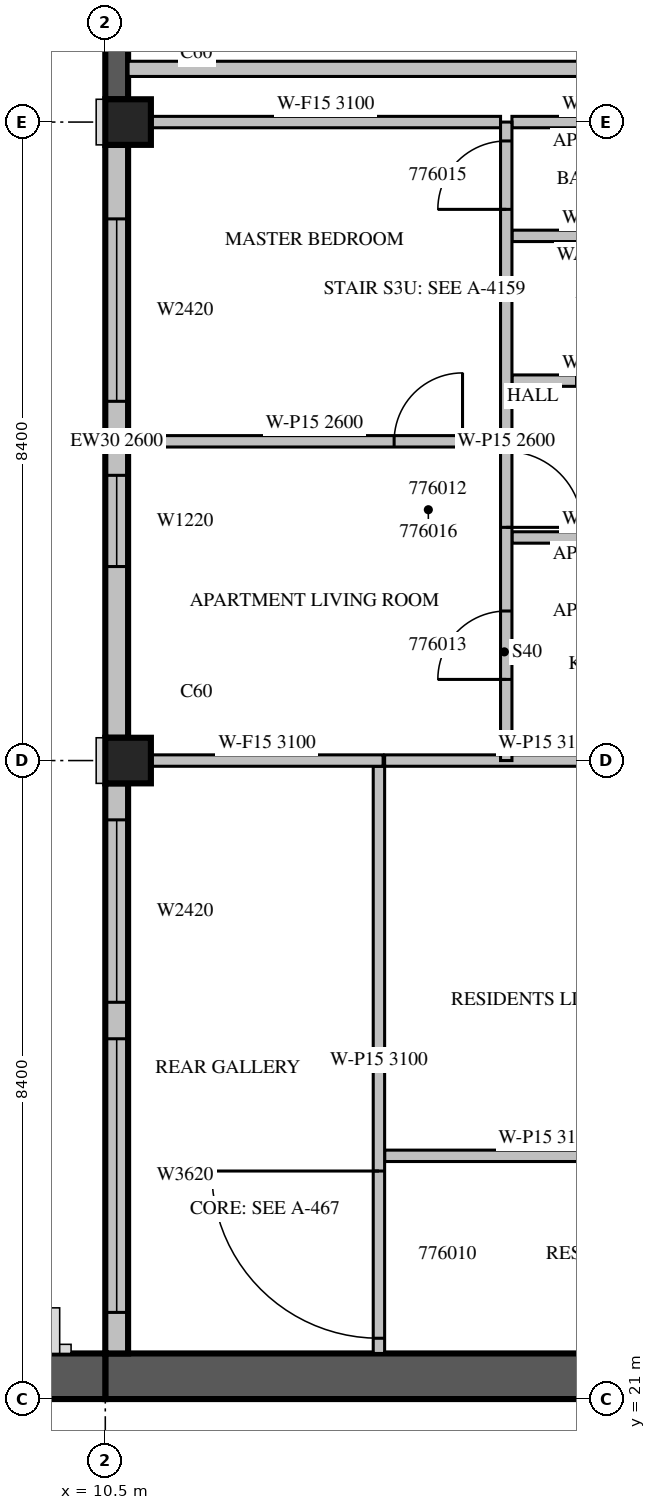
"""IFC4 building model, lengths in metres.
Left out: names, types, materials, properties, quantities, classifications, styles, units other than length and angle.
Written with IfcOpenShell. Run it as: python <this file> out.ifc"""

import sys

from ifc_helpers import new_model, si_unit, direction, frame, frame_2d, origin, origin_2d, place, context, subcontext, project, spatial, rectangle, extrude, source, transform, mapped, element, fill, save


model = new_model("IFC4")
c1 = context("Model", 3, precision=1e-05, world=origin(), true_north=direction((0.0, 1.0)))
c2 = subcontext(c1, "Body", "Model", "MODEL_VIEW")
j1 = project(units=[si_unit("LENGTHUNIT", "METRE"), si_unit("PLANEANGLEUNIT", "RADIAN")], contexts=[c1])
p1 = place(None, origin())
s1 = spatial("IfcSite", under=j1, at=p1, CompositionType="ELEMENT")
p2 = place(p1, origin())
s2 = spatial("IfcBuilding", under=s1, at=p2, CompositionType="ELEMENT")
p3 = place(p2, frame((0.0, 0.0, 326.5)))
s3 = spatial("IfcBuildingStorey", under=s2, at=p3, CompositionType="ELEMENT", Elevation=326.5)
m1 = source(origin(), c2, "Body", "SweptSolid", [
    extrude(rectangle(XDim=0.6, YDim=0.6, at=origin_2d()), origin(), (0.0, 0.0, 1.0), 3.5),
])
for number, where, z_axis, x_axis in (
    (1, (10.8, 29.4, 0.0), (0.0, 0.0, 1.0), (1.0, 0.0, 0.0)),
    (2, (10.8, 37.8, 0.0), (0.0, 0.0, 1.0), (1.0, 0.0, 0.0)),
):
    element("IfcColumn", number, at=place(p3, frame(where, z_axis=z_axis, x_axis=x_axis)), inside=s3, PredefinedType="COLUMN", context=c2, shape_type="MappedRepresentation", body=[
        mapped(m1, transform((0.0, 0.0, 0.0), scale=1.0)),
    ])
m2 = source(origin(), c2, "Body", "SweptSolid", [
    extrude(rectangle(XDim=11.1, YDim=0.6, at=frame_2d((5.55, 0.0))), origin(), (0.0, 0.0, 1.0), 3.5),
])
p4 = place(p3, frame((10.5, 21.3, 0.0), z_axis=(0.0, 0.0, 1.0), x_axis=(1.0, 0.0, 0.0)))
e3 = element("IfcWall", 3, at=p4, inside=s3, PredefinedType="SHEAR", context=c2, shape_type="MappedRepresentation", body=[
    mapped(m2, transform((0.0, 0.0, 0.0), scale=1.0)),
])
m3 = source(origin(), c2, "Body", "SweptSolid", [
    extrude(rectangle(XDim=1.2, YDim=2.1, at=frame_2d((0.6, 1.05))), frame((0.0, 0.31, 0.0), z_axis=(0.0, -1.0, 0.0), x_axis=(1.0, 0.0, 0.0)), (0.0, 0.0, 1.0), 0.62),
])
p5 = place(p4, frame((8.7, 0.0, 0.0)))
e4 = element("IfcOpeningElement", 4, at=p5, cuts=e3, PredefinedType="OPENING", context=c2, shape_type="MappedRepresentation", body=[
    mapped(m3, transform((0.0, 0.0, 0.0), scale=1.0)),
])
m4 = source(origin(), c2, "Body", "SweptSolid", [
    extrude(rectangle(XDim=6.6, YDim=0.6, at=frame_2d((3.3, 0.0))), origin(), (0.0, 0.0, 1.0), 3.5),
])
p6 = place(p3, frame((3.9, 21.3, 0.0), z_axis=(0.0, 0.0, 1.0), x_axis=(1.0, 0.0, 0.0)))
e5 = element("IfcWall", 5, at=p6, inside=s3, PredefinedType="SHEAR", context=c2, shape_type="MappedRepresentation", body=[
    mapped(m4, transform((0.0, 0.0, 0.0), scale=1.0)),
])
m5 = source(origin(), c2, "Body", "SweptSolid", [
    extrude(rectangle(XDim=1.2, YDim=2.4, at=frame_2d((0.6, 1.2))), frame((0.0, 0.31, 0.0), z_axis=(0.0, -1.0, 0.0), x_axis=(1.0, 0.0, 0.0)), (0.0, 0.0, 1.0), 0.62),
])
p7 = place(p6, frame((1.5, 0.0, 0.6)))
e6 = element("IfcOpeningElement", 6, at=p7, cuts=e5, PredefinedType="OPENING", context=c2, shape_type="MappedRepresentation", body=[
    mapped(m5, transform((0.0, 0.0, 0.0), scale=1.0)),
])
p8 = place(p6, frame((3.6, 0.0, 0.6)))
e7 = element("IfcOpeningElement", 7, at=p8, cuts=e5, PredefinedType="OPENING", context=c2, shape_type="MappedRepresentation", body=[
    mapped(m5, transform((0.0, 0.0, 0.0), scale=1.0)),
])
p9 = place(p3, frame((10.65, 43.68, 0.0), z_axis=(0.0, 0.0, 1.0), x_axis=(0.0, -1.0, 0.0)))
e8 = element("IfcWall", 8, at=p9, inside=s3, PredefinedType="SOLIDWALL", context=c2, shape_type="SweptSolid", body=[
    extrude(rectangle(XDim=5.58, YDim=0.3, at=frame_2d((2.79, 0.0))), origin(), (0.0, 0.0, 1.0), 3.1),
])
m6 = source(origin(), c2, "Body", "SweptSolid", [
    extrude(rectangle(XDim=7.8, YDim=0.3, at=frame_2d((3.9, 0.0))), origin(), (0.0, 0.0, 1.0), 2.6),
])
p10 = place(p3, frame((10.65, 37.5, 0.0), z_axis=(0.0, 0.0, 1.0), x_axis=(0.0, -1.0, 0.0)))
e9 = element("IfcWall", 9, at=p10, inside=s3, PredefinedType="STANDARD", context=c2, shape_type="MappedRepresentation", body=[
    mapped(m6, transform((0.0, 0.0, 0.0), scale=1.0)),
])
m7 = source(origin(), c2, "Body", "SweptSolid", [
    extrude(rectangle(XDim=1.2, YDim=2.0, at=frame_2d((0.6, 1.0))), frame((0.0, 0.16, 0.0), z_axis=(0.0, -1.0, 0.0), x_axis=(1.0, 0.0, 0.0)), (0.0, 0.0, 1.0), 0.32),
])
p11 = place(p10, frame((4.348, 0.0, 0.6)))
e10 = element("IfcOpeningElement", 10, at=p11, cuts=e9, PredefinedType="OPENING", context=c2, shape_type="MappedRepresentation", body=[
    mapped(m7, transform((0.0, 0.0, 0.0), scale=1.0)),
])
m8 = source(origin(), c2, "Body", "SweptSolid", [
    extrude(rectangle(XDim=2.4, YDim=2.0, at=frame_2d((1.2, 1.0))), frame((0.0, 0.16, 0.0), z_axis=(0.0, -1.0, 0.0), x_axis=(1.0, 0.0, 0.0)), (0.0, 0.0, 1.0), 0.32),
])
p12 = place(p10, frame((0.974, 0.0, 0.6)))
e11 = element("IfcOpeningElement", 11, at=p12, cuts=e9, PredefinedType="OPENING", context=c2, shape_type="MappedRepresentation", body=[
    mapped(m8, transform((0.0, 0.0, 0.0), scale=1.0)),
])
m9 = source(origin(), c2, "Body", "SweptSolid", [
    extrude(rectangle(XDim=7.5, YDim=0.3, at=frame_2d((3.75, 0.0))), origin(), (0.0, 0.0, 1.0), 3.1),
])
p13 = place(p3, frame((10.65, 29.1, 0.0), z_axis=(0.0, 0.0, 1.0), x_axis=(0.0, -1.0, 0.0)))
e12 = element("IfcWall", 12, at=p13, inside=s3, PredefinedType="STANDARD", context=c2, shape_type="MappedRepresentation", body=[
    mapped(m9, transform((0.0, 0.0, 0.0), scale=1.0)),
])
m10 = source(origin(), c2, "Body", "SweptSolid", [
    extrude(rectangle(XDim=3.6, YDim=2.0, at=frame_2d((1.8, 1.0))), frame((0.0, 0.16, 0.0), z_axis=(0.0, -1.0, 0.0), x_axis=(1.0, 0.0, 0.0)), (0.0, 0.0, 1.0), 0.32),
])
p14 = place(p13, frame((3.36, 0.0, 0.6)))
e13 = element("IfcOpeningElement", 13, at=p14, cuts=e12, PredefinedType="OPENING", context=c2, shape_type="MappedRepresentation", body=[
    mapped(m10, transform((0.0, 0.0, 0.0), scale=1.0)),
])
p15 = place(p13, frame((0.48, 0.0, 0.6)))
e14 = element("IfcOpeningElement", 14, at=p15, cuts=e12, PredefinedType="OPENING", context=c2, shape_type="MappedRepresentation", body=[
    mapped(m8, transform((0.0, 0.0, 0.0), scale=1.0)),
])
m11 = source(origin(), c2, "Body", "SweptSolid", [
    extrude(rectangle(XDim=8.0, YDim=0.2, at=frame_2d((4.0, 0.0))), origin(), (0.0, 0.0, 1.0), 3.1),
])
p16 = place(p3, frame((10.8, 38.5, 0.0), z_axis=(0.0, 0.0, 1.0), x_axis=(1.0, 0.0, 0.0)))
e15 = element("IfcWall", 15, at=p16, inside=s3, PredefinedType="PARTITIONING", context=c2, shape_type="MappedRepresentation", body=[
    mapped(m11, transform((0.0, 0.0, 0.0), scale=1.0)),
])
m12 = source(origin(), c2, "Body", "SweptSolid", [
    extrude(rectangle(XDim=4.275, YDim=0.15, at=frame_2d((2.138, 0.0))), origin(), (0.0, 0.0, 1.0), 3.1),
])
for number, where, z_axis, x_axis in (
    (16, (14.175, 24.2, 0.0), (0.0, 0.0, 1.0), (1.0, 0.0, 0.0)),
    (17, (18.45, 29.4, 0.0), (0.0, 0.0, 1.0), (-1.0, 0.0, 0.0)),
):
    element("IfcWall", number, at=place(p3, frame(where, z_axis=z_axis, x_axis=x_axis)), inside=s3, PredefinedType="PARTITIONING", context=c2, shape_type="MappedRepresentation", body=[
        mapped(m12, transform((0.0, 0.0, 0.0), scale=1.0)),
    ])
m13 = source(origin(), c2, "Body", "SweptSolid", [
    extrude(rectangle(XDim=7.725, YDim=0.15, at=frame_2d((3.862, 0.0))), origin(), (0.0, 0.0, 1.0), 3.1),
])
p17 = place(p3, frame((14.1, 29.325, 0.0), z_axis=(0.0, 0.0, 1.0), x_axis=(0.0, -1.0, 0.0)))
e18 = element("IfcWall", 18, at=p17, inside=s3, PredefinedType="PARTITIONING", context=c2, shape_type="MappedRepresentation", body=[
    mapped(m13, transform((0.0, 0.0, 0.0), scale=1.0)),
])
m14 = source(origin(), c2, "Body", "SweptSolid", [
    extrude(rectangle(XDim=2.2, YDim=2.1, at=frame_2d((1.1, 1.05))), frame((0.0, 0.085, 0.0), z_axis=(0.0, -1.0, 0.0), x_axis=(1.0, 0.0, 0.0)), (0.0, 0.0, 1.0), 0.17),
])
p18 = place(p17, frame((5.325, 0.0, 0.0)))
e19 = element("IfcOpeningElement", 19, at=p18, cuts=e18, PredefinedType="OPENING", context=c2, shape_type="MappedRepresentation", body=[
    mapped(m14, transform((0.0, 0.0, 0.0), scale=1.0)),
])
p19 = place(p3, frame((15.7, 33.6, 0.0), z_axis=(0.0, 0.0, 1.0), x_axis=(-1.0, 0.0, 0.0)))
e20 = element("IfcWall", 20, at=p19, inside=s3, PredefinedType="PARTITIONING", context=c2, shape_type="SweptSolid", body=[
    extrude(rectangle(XDim=4.9, YDim=0.15, at=frame_2d((2.45, 0.0))), origin(), (0.0, 0.0, 1.0), 2.6),
])
m15 = source(origin(), c2, "Body", "SweptSolid", [
    extrude(rectangle(XDim=0.9, YDim=2.1, at=frame_2d((0.45, 1.05))), frame((0.0, 0.085, 0.0), z_axis=(0.0, -1.0, 0.0), x_axis=(1.0, 0.0, 0.0)), (0.0, 0.0, 1.0), 0.17),
])
p20 = place(p19, frame((0.5, 0.0, 0.0)))
e21 = element("IfcOpeningElement", 21, at=p20, cuts=e20, PredefinedType="OPENING", context=c2, shape_type="MappedRepresentation", body=[
    mapped(m15, transform((0.0, 0.0, 0.0), scale=1.0)),
])
m16 = source(origin(), c2, "Body", "SweptSolid", [
    extrude(rectangle(XDim=2.6, YDim=0.15, at=frame_2d((1.3, 0.0))), origin(), (0.0, 0.0, 1.0), 3.1),
])
p21 = place(p3, frame((18.45, 32.335, 0.0), z_axis=(0.0, 0.0, 1.0), x_axis=(-1.0, 0.0, 0.0)))
e22 = element("IfcWall", 22, at=p21, inside=s3, PredefinedType="PARTITIONING", context=c2, shape_type="MappedRepresentation", body=[
    mapped(m16, transform((0.0, 0.0, 0.0), scale=1.0)),
])
p22 = place(p3, frame((18.45, 34.398, 0.0), z_axis=(0.0, 0.0, 1.0), x_axis=(-1.0, 0.0, 0.0)))
e23 = element("IfcWall", 23, at=p22, inside=s3, PredefinedType="PARTITIONING", context=c2, shape_type="MappedRepresentation", body=[
    mapped(m16, transform((0.0, 0.0, 0.0), scale=1.0)),
])
p23 = place(p22, frame((0.85, 0.0, 0.0)))
e24 = element("IfcOpeningElement", 24, at=p23, cuts=e23, PredefinedType="OPENING", context=c2, shape_type="MappedRepresentation", body=[
    mapped(m15, transform((0.0, 0.0, 0.0), scale=1.0)),
])
p24 = place(p3, frame((18.45, 36.303, 0.0), z_axis=(0.0, 0.0, 1.0), x_axis=(-1.0, 0.0, 0.0)))
e25 = element("IfcWall", 25, at=p24, inside=s3, PredefinedType="PARTITIONING", context=c2, shape_type="MappedRepresentation", body=[
    mapped(m16, transform((0.0, 0.0, 0.0), scale=1.0)),
])
m17 = source(origin(), c2, "Body", "SweptSolid", [
    extrude(rectangle(XDim=3.056, YDim=0.15, at=frame_2d((1.528, 0.0))), origin(), (0.0, 0.0, 1.0), 3.1),
])
p25 = place(p3, frame((14.155, 29.4, 0.0), z_axis=(0.0, 0.0, 1.0), x_axis=(-1.0, 0.0, 0.0)))
e26 = element("IfcWall", 26, at=p25, inside=s3, PredefinedType="PARTITIONING", context=c2, shape_type="MappedRepresentation", body=[
    mapped(m17, transform((0.0, 0.0, 0.0), scale=1.0)),
])
m18 = source(origin(), c2, "Body", "SweptSolid", [
    extrude(rectangle(XDim=4.601, YDim=0.15, at=frame_2d((2.3, 0.0))), origin(), (0.0, 0.0, 1.0), 3.1),
])
p26 = place(p3, frame((15.7, 37.8, 0.0), z_axis=(0.0, 0.0, 1.0), x_axis=(-1.0, 0.0, 0.0)))
e27 = element("IfcWall", 27, at=p26, inside=s3, PredefinedType="PARTITIONING", context=c2, shape_type="MappedRepresentation", body=[
    mapped(m18, transform((0.0, 0.0, 0.0), scale=1.0)),
])
p27 = place(p3, frame((18.45, 37.8, 0.0), z_axis=(0.0, 0.0, 1.0), x_axis=(-1.0, 0.0, 0.0)))
e28 = element("IfcWall", 28, at=p27, inside=s3, PredefinedType="PARTITIONING", context=c2, shape_type="MappedRepresentation", body=[
    mapped(m16, transform((0.0, 0.0, 0.0), scale=1.0)),
])
m19 = source(origin(), c2, "Body", "SweptSolid", [
    extrude(rectangle(XDim=8.4, YDim=0.15, at=frame_2d((4.2, 0.0))), origin(), (0.0, 0.0, 1.0), 2.6),
])
p28 = place(p3, frame((15.775, 29.4, 0.0), z_axis=(0.0, 0.0, 1.0), x_axis=(0.0, 1.0, 0.0)))
e29 = element("IfcWall", 29, at=p28, inside=s3, PredefinedType="PARTITIONING", context=c2, shape_type="MappedRepresentation", body=[
    mapped(m19, transform((0.0, 0.0, 0.0), scale=1.0)),
])
m20 = source(origin(), c2, "Body", "SweptSolid", [
    extrude(rectangle(XDim=1.0, YDim=2.1, at=frame_2d((0.5, 1.05))), frame((0.0, 0.085, 0.0), z_axis=(0.0, -1.0, 0.0), x_axis=(1.0, 0.0, 0.0)), (0.0, 0.0, 1.0), 0.17),
])
p29 = place(p28, frame((3.068, 0.0, 0.0)))
e30 = element("IfcOpeningElement", 30, at=p29, cuts=e29, PredefinedType="OPENING", context=c2, shape_type="MappedRepresentation", body=[
    mapped(m20, transform((0.0, 0.0, 0.0), scale=1.0)),
])
p30 = place(p28, frame((1.067, 0.0, 0.0)))
e31 = element("IfcOpeningElement", 31, at=p30, cuts=e29, PredefinedType="OPENING", context=c2, shape_type="MappedRepresentation", body=[
    mapped(m15, transform((0.0, 0.0, 0.0), scale=1.0)),
])
p31 = place(p28, frame((7.252, 0.0, 0.0)))
e32 = element("IfcOpeningElement", 32, at=p31, cuts=e29, PredefinedType="OPENING", context=c2, shape_type="MappedRepresentation", body=[
    mapped(m15, transform((0.0, 0.0, 0.0), scale=1.0)),
])
m21 = source(origin(), c2, "Body", "SweptSolid", [
    extrude(rectangle(XDim=1.2, YDim=2.0, at=frame_2d((0.6, 1.0))), frame((0.0, 0.03, 0.0), z_axis=(0.0, -1.0, 0.0), x_axis=(1.0, 0.0, 0.0)), (0.0, 0.0, 1.0), 0.06),
])
p32 = place(p11, origin())
e33 = element("IfcWindow", 33, at=p32, inside=s3, PartitioningType="SINGLE_PANEL", PredefinedType="WINDOW", context=c2, shape_type="MappedRepresentation", body=[
    mapped(m21, transform((0.0, 0.0, 0.0), scale=1.0)),
])
fill(e10, e33)
m22 = source(origin(), c2, "Body", "SweptSolid", [
    extrude(rectangle(XDim=3.6, YDim=2.0, at=frame_2d((1.8, 1.0))), frame((0.0, 0.03, 0.0), z_axis=(0.0, -1.0, 0.0), x_axis=(1.0, 0.0, 0.0)), (0.0, 0.0, 1.0), 0.06),
])
p33 = place(p14, origin())
e34 = element("IfcWindow", 34, at=p33, inside=s3, PartitioningType="SINGLE_PANEL", PredefinedType="WINDOW", context=c2, shape_type="MappedRepresentation", body=[
    mapped(m22, transform((0.0, 0.0, 0.0), scale=1.0)),
])
fill(e13, e34)
m23 = source(origin(), c2, "Body", "SweptSolid", [
    extrude(rectangle(XDim=2.4, YDim=2.0, at=frame_2d((1.2, 1.0))), frame((0.0, 0.03, 0.0), z_axis=(0.0, -1.0, 0.0), x_axis=(1.0, 0.0, 0.0)), (0.0, 0.0, 1.0), 0.06),
])
p34 = place(p12, origin())
e35 = element("IfcWindow", 35, at=p34, inside=s3, PartitioningType="SINGLE_PANEL", PredefinedType="WINDOW", context=c2, shape_type="MappedRepresentation", body=[
    mapped(m23, transform((0.0, 0.0, 0.0), scale=1.0)),
])
fill(e11, e35)
p35 = place(p15, origin())
e36 = element("IfcWindow", 36, at=p35, inside=s3, PartitioningType="SINGLE_PANEL", PredefinedType="WINDOW", context=c2, shape_type="MappedRepresentation", body=[
    mapped(m23, transform((0.0, 0.0, 0.0), scale=1.0)),
])
fill(e14, e36)
m24 = source(origin(), c2, "Body", "SweptSolid", [
    extrude(rectangle(XDim=2.2, YDim=2.1, at=frame_2d((1.1, 1.05))), frame((0.0, 0.025, 0.0), z_axis=(0.0, -1.0, 0.0), x_axis=(1.0, 0.0, 0.0)), (0.0, 0.0, 1.0), 0.05),
])
p36 = place(p18, origin())
e37 = element("IfcDoor", 37, at=p36, inside=s3, OperationType="DOUBLE_DOOR_SINGLE_SWING", PredefinedType="DOOR", context=c2, shape_type="MappedRepresentation", body=[
    mapped(m24, transform((0.0, 0.0, 0.0), scale=1.0)),
])
fill(e19, e37)
m25 = source(origin(), c2, "Body", "SweptSolid", [
    extrude(rectangle(XDim=1.0, YDim=2.1, at=frame_2d((0.5, 1.05))), frame((0.0, 0.025, 0.0), z_axis=(0.0, -1.0, 0.0), x_axis=(1.0, 0.0, 0.0)), (0.0, 0.0, 1.0), 0.05),
])
p37 = place(p29, origin())
e38 = element("IfcDoor", 38, at=p37, inside=s3, OperationType="SINGLE_SWING_RIGHT", PredefinedType="DOOR", context=c2, shape_type="MappedRepresentation", body=[
    mapped(m25, transform((0.0, 0.0, 0.0), scale=1.0)),
])
fill(e30, e38)
m26 = source(origin(), c2, "Body", "SweptSolid", [
    extrude(rectangle(XDim=0.9, YDim=2.1, at=frame_2d((0.45, 1.05))), frame((0.0, 0.025, 0.0), z_axis=(0.0, -1.0, 0.0), x_axis=(1.0, 0.0, 0.0)), (0.0, 0.0, 1.0), 0.05),
])
p38 = place(p30, origin())
e39 = element("IfcDoor", 39, at=p38, inside=s3, OperationType="SINGLE_SWING_LEFT", PredefinedType="DOOR", context=c2, shape_type="MappedRepresentation", body=[
    mapped(m26, transform((0.0, 0.0, 0.0), scale=1.0)),
])
fill(e31, e39)
p39 = place(p31, origin())
e40 = element("IfcDoor", 40, at=p39, inside=s3, OperationType="SINGLE_SWING_LEFT", PredefinedType="DOOR", context=c2, shape_type="MappedRepresentation", body=[
    mapped(m26, transform((0.0, 0.0, 0.0), scale=1.0)),
])
fill(e32, e40)
p40 = place(p20, origin())
e41 = element("IfcDoor", 41, at=p40, inside=s3, OperationType="SINGLE_SWING_RIGHT", PredefinedType="DOOR", context=c2, shape_type="MappedRepresentation", body=[
    mapped(m26, transform((0.0, 0.0, 0.0), scale=1.0)),
])
fill(e21, e41)
save(model, sys.argv[1])
